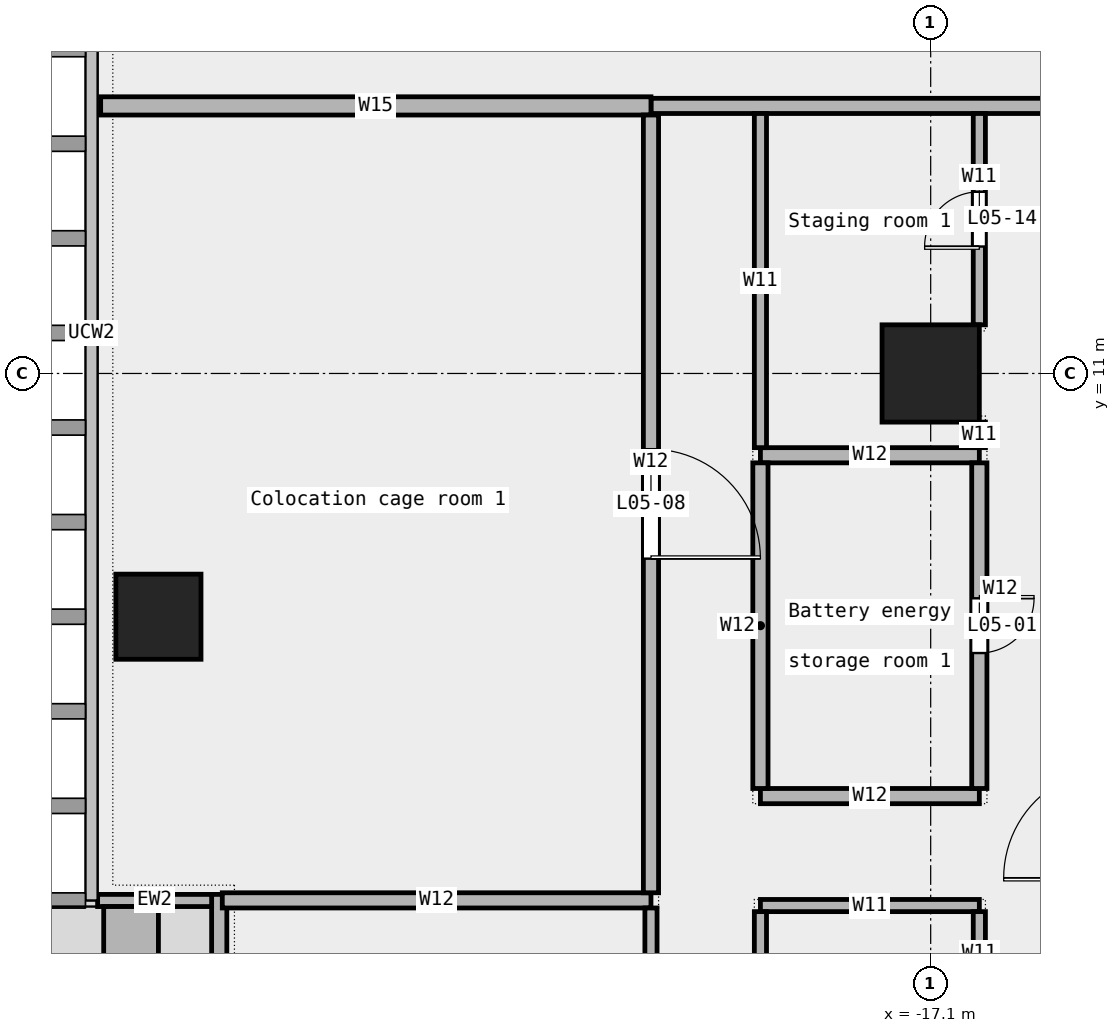
"""IFC4 building model, lengths in metres.
Left out: names, types, materials, properties, quantities, classifications, styles, units other than length and angle.
Written with IfcOpenShell. Run it as: python <this file> out.ifc"""

import sys

from ifc_helpers import new_model, si_unit, direction, frame, frame_2d, origin, origin_2d, place, context, subcontext, project, spatial, rectangle, extrude, element, fill, save


model = new_model("IFC4")
c1 = context("Model", 3, precision=1e-05, world=origin(), true_north=direction((0.0, 1.0)))
c2 = subcontext(c1, "Body", "Model", "MODEL_VIEW")
j1 = project(units=[si_unit("LENGTHUNIT", "METRE"), si_unit("PLANEANGLEUNIT", "RADIAN")], contexts=[c1])
p1 = place(None, origin())
s1 = spatial("IfcSite", under=j1, at=p1, CompositionType="ELEMENT")
p2 = place(p1, origin())
s2 = spatial("IfcBuilding", under=s1, at=p2, CompositionType="ELEMENT")
p3 = place(p2, frame((0.0, 0.0, 31.0)))
s3 = spatial("IfcBuildingStorey", under=s2, at=p3, CompositionType="ELEMENT", Elevation=31.0)
p4 = place(p3, frame((-29.8, 7.0, 0.0), z_axis=(0.0, 0.0, 1.0), x_axis=(1.0, 0.0, 0.0)))
e1 = element("IfcColumn", 1, at=p4, inside=s3, PredefinedType="COLUMN", context=c2, shape_type="SweptSolid", body=[
    extrude(rectangle(XDim=1.4, YDim=1.4, at=origin_2d()), origin(), (0.0, 0.0, 1.0), 4.35),
])
p5 = place(p3, frame((-17.1, 11.0, 0.0), z_axis=(0.0, 0.0, 1.0), x_axis=(1.0, 0.0, 0.0)))
e2 = element("IfcColumn", 2, at=p5, inside=s3, PredefinedType="COLUMN", context=c2, shape_type="SweptSolid", body=[
    extrude(rectangle(XDim=1.6, YDim=1.6, at=origin_2d()), origin(), (0.0, 0.0, 1.0), 4.35),
])
p6 = place(p3, frame((-28.8, 2.433, 0.0), z_axis=(0.0, 0.0, 1.0), x_axis=(0.0, -1.0, 0.0)))
e3 = element("IfcWall", 3, at=p6, inside=s3, PredefinedType="STANDARD", context=c2, shape_type="SweptSolid", body=[
    extrude(rectangle(XDim=14.2, YDim=0.25, at=frame_2d((7.1, 0.0))), origin(), (0.0, 0.0, 1.0), 4.35),
])
p7 = place(p6, frame((1.75, 0.0, 0.45)))
e4 = element("IfcOpeningElement", 4, at=p7, cuts=e3, PredefinedType="OPENING", context=c2, shape_type="SweptSolid", body=[
    extrude(rectangle(XDim=1.5, YDim=3.0, at=frame_2d((0.75, 1.5))), frame((0.0, 0.137, 0.0), z_axis=(0.0, -1.0, 0.0), x_axis=(1.0, 0.0, 0.0)), (0.0, 0.0, 1.0), 0.274),
])
p8 = place(p6, frame((6.25, 0.0, 0.0)))
e5 = element("IfcOpeningElement", 5, at=p8, cuts=e3, PredefinedType="OPENING", context=c2, shape_type="SweptSolid", body=[
    extrude(rectangle(XDim=1.8, YDim=2.4, at=frame_2d((0.9, 1.2))), frame((0.0, 0.137, 0.0), z_axis=(0.0, -1.0, 0.0), x_axis=(1.0, 0.0, 0.0)), (0.0, 0.0, 1.0), 0.274),
])
p9 = place(p6, frame((11.0, 0.0, 0.45)))
e6 = element("IfcOpeningElement", 6, at=p9, cuts=e3, PredefinedType="OPENING", context=c2, shape_type="SweptSolid", body=[
    extrude(rectangle(XDim=1.5, YDim=3.0, at=frame_2d((0.75, 1.5))), frame((0.0, 0.137, 0.0), z_axis=(0.0, -1.0, 0.0), x_axis=(1.0, 0.0, 0.0)), (0.0, 0.0, 1.0), 0.274),
])
p10 = place(p3, frame((-30.8, 2.333, 0.0), z_axis=(0.0, 0.0, 1.0), x_axis=(1.0, 0.0, 0.0)))
e7 = element("IfcWall", 7, at=p10, inside=s3, PredefinedType="STANDARD", context=c2, shape_type="SweptSolid", body=[
    extrude(rectangle(XDim=1.875, YDim=0.2, at=frame_2d((0.938, 0.0))), origin(), (0.0, 0.0, 1.0), 4.35),
])
p11 = place(p3, frame((-30.25, 2.233, 0.0), z_axis=(0.0, 0.0, 1.0), x_axis=(0.0, -1.0, 0.0)))
e8 = element("IfcWall", 8, at=p11, inside=s3, PredefinedType="STANDARD", context=c2, shape_type="SweptSolid", body=[
    extrude(rectangle(XDim=3.6, YDim=0.9, at=frame_2d((1.8, 0.0))), origin(), (0.0, 0.0, 1.0), 0.7),
])
p12 = place(p3, frame((-19.9, 2.25, 0.0), z_axis=(0.0, 0.0, 1.0), x_axis=(1.0, 0.0, 0.0)))
e9 = element("IfcWall", 9, at=p12, inside=s3, PredefinedType="PARTITIONING", context=c2, shape_type="SweptSolid", body=[
    extrude(rectangle(XDim=3.6, YDim=0.2, at=frame_2d((1.8, 0.0))), origin(), (0.0, 0.0, 1.0), 4.35),
])
p13 = place(p3, frame((-28.75, 2.335, 0.0), z_axis=(0.0, 0.0, 1.0), x_axis=(1.0, 0.0, 0.0)))
e10 = element("IfcWall", 10, at=p13, inside=s3, PredefinedType="PARTITIONING", context=c2, shape_type="SweptSolid", body=[
    extrude(rectangle(XDim=7.05, YDim=0.25, at=frame_2d((3.525, 0.0))), origin(), (0.0, 0.0, 1.0), 4.35),
])
for number, where, z_axis, x_axis in (
    (11, (-19.9, 4.05, 0.0), (0.0, 0.0, 1.0), (1.0, 0.0, 0.0)),
    (12, (-19.9, 9.655, 0.0), (0.0, 0.0, 1.0), (1.0, 0.0, 0.0)),
):
    element("IfcWall", number, at=place(p3, frame(where, z_axis=z_axis, x_axis=x_axis)), inside=s3, PredefinedType="PARTITIONING", context=c2, shape_type="SweptSolid", body=[
        extrude(rectangle(XDim=3.6, YDim=0.25, at=frame_2d((1.8, 0.0))), origin(), (0.0, 0.0, 1.0), 4.35),
    ])
p14 = place(p3, frame((-21.7, 15.4, 0.0), z_axis=(0.0, 0.0, 1.0), x_axis=(1.0, 0.0, 0.0)))
e13 = element("IfcWall", 13, at=p14, inside=s3, PredefinedType="PARTITIONING", context=c2, shape_type="SweptSolid", body=[
    extrude(rectangle(XDim=14.935, YDim=0.25, at=frame_2d((7.468, 0.0))), origin(), (0.0, 0.0, 1.0), 4.35),
])
p15 = place(p14, frame((12.775, 0.0, 0.0)))
e14 = element("IfcOpeningElement", 14, at=p15, cuts=e13, PredefinedType="OPENING", context=c2, shape_type="SweptSolid", body=[
    extrude(rectangle(XDim=0.9, YDim=2.1, at=frame_2d((0.45, 1.05))), frame((0.0, 0.137, 0.0), z_axis=(0.0, -1.0, 0.0), x_axis=(1.0, 0.0, 0.0)), (0.0, 0.0, 1.0), 0.274),
])
p16 = place(p14, frame((7.558, 0.0, 0.0)))
e15 = element("IfcOpeningElement", 15, at=p16, cuts=e13, PredefinedType="OPENING", context=c2, shape_type="SweptSolid", body=[
    extrude(rectangle(XDim=1.8, YDim=2.1, at=frame_2d((0.9, 1.05))), frame((0.0, 0.137, 0.0), z_axis=(0.0, -1.0, 0.0), x_axis=(1.0, 0.0, 0.0)), (0.0, 0.0, 1.0), 0.274),
])
p17 = place(p3, frame((-30.75, 15.4, 0.0), z_axis=(0.0, 0.0, 1.0), x_axis=(1.0, 0.0, 0.0)))
e16 = element("IfcWall", 16, at=p17, inside=s3, PredefinedType="PARTITIONING", context=c2, shape_type="SweptSolid", body=[
    extrude(rectangle(XDim=9.05, YDim=0.3, at=frame_2d((4.525, 0.0))), origin(), (0.0, 0.0, 1.0), 4.35),
])
p18 = place(p3, frame((-21.7, -9.0, 0.0), z_axis=(0.0, 0.0, 1.0), x_axis=(0.0, 1.0, 0.0)))
e17 = element("IfcWall", 17, at=p18, inside=s3, PredefinedType="PARTITIONING", context=c2, shape_type="SweptSolid", body=[
    extrude(rectangle(XDim=11.21, YDim=0.2, at=frame_2d((5.605, 0.0))), origin(), (0.0, 0.0, 1.0), 4.35),
])
p19 = place(p18, frame((4.705, 0.0, 0.0)))
e18 = element("IfcOpeningElement", 18, at=p19, cuts=e17, PredefinedType="OPENING", context=c2, shape_type="SweptSolid", body=[
    extrude(rectangle(XDim=1.8, YDim=2.1, at=frame_2d((0.9, 1.05))), frame((0.0, 0.112, 0.0), z_axis=(0.0, -1.0, 0.0), x_axis=(1.0, 0.0, 0.0)), (0.0, 0.0, 1.0), 0.224),
])
p20 = place(p3, frame((-21.7, 2.46, 0.0), z_axis=(0.0, 0.0, 1.0), x_axis=(0.0, 1.0, 0.0)))
e19 = element("IfcWall", 19, at=p20, inside=s3, PredefinedType="PARTITIONING", context=c2, shape_type="SweptSolid", body=[
    extrude(rectangle(XDim=12.79, YDim=0.25, at=frame_2d((6.395, 0.0))), origin(), (0.0, 0.0, 1.0), 4.35),
])
p21 = place(p20, frame((5.495, 0.0, 0.0)))
e20 = element("IfcOpeningElement", 20, at=p21, cuts=e19, PredefinedType="OPENING", context=c2, shape_type="SweptSolid", body=[
    extrude(rectangle(XDim=1.8, YDim=2.1, at=frame_2d((0.9, 1.05))), frame((0.0, 0.137, 0.0), z_axis=(0.0, -1.0, 0.0), x_axis=(1.0, 0.0, 0.0)), (0.0, 0.0, 1.0), 0.274),
])
p22 = place(p3, frame((-19.9, -9.0, 0.0), z_axis=(0.0, 0.0, 1.0), x_axis=(0.0, 1.0, 0.0)))
e21 = element("IfcWall", 21, at=p22, inside=s3, PredefinedType="PARTITIONING", context=c2, shape_type="SweptSolid", body=[
    extrude(rectangle(XDim=11.15, YDim=0.2, at=frame_2d((5.575, 0.0))), origin(), (0.0, 0.0, 1.0), 4.35),
])
p23 = place(p3, frame((-19.9, 9.78, 0.0), z_axis=(0.0, 0.0, 1.0), x_axis=(0.0, 1.0, 0.0)))
e22 = element("IfcWall", 22, at=p23, inside=s3, PredefinedType="PARTITIONING", context=c2, shape_type="SweptSolid", body=[
    extrude(rectangle(XDim=5.495, YDim=0.2, at=frame_2d((2.748, 0.0))), origin(), (0.0, 0.0, 1.0), 4.35),
])
p24 = place(p3, frame((-19.9, 4.175, 0.0), z_axis=(0.0, 0.0, 1.0), x_axis=(0.0, 1.0, 0.0)))
e23 = element("IfcWall", 23, at=p24, inside=s3, PredefinedType="PARTITIONING", context=c2, shape_type="SweptSolid", body=[
    extrude(rectangle(XDim=5.355, YDim=0.25, at=frame_2d((2.677, 0.0))), origin(), (0.0, 0.0, 1.0), 4.35),
])
p25 = place(p3, frame((-16.3, 0.8, 0.0), z_axis=(0.0, 0.0, 1.0), x_axis=(0.0, 1.0, 0.0)))
e24 = element("IfcWall", 24, at=p25, inside=s3, PredefinedType="PARTITIONING", context=c2, shape_type="SweptSolid", body=[
    extrude(rectangle(XDim=1.35, YDim=0.2, at=frame_2d((0.675, 0.0))), origin(), (0.0, 0.0, 1.0), 4.35),
])
p26 = place(p3, frame((-16.3, 9.78, 0.0), z_axis=(0.0, 0.0, 1.0), x_axis=(0.0, 1.0, 0.0)))
e25 = element("IfcWall", 25, at=p26, inside=s3, PredefinedType="PARTITIONING", context=c2, shape_type="SweptSolid", body=[
    extrude(rectangle(XDim=0.42, YDim=0.2, at=frame_2d((0.21, 0.0))), origin(), (0.0, 0.0, 1.0), 4.35),
])
p27 = place(p3, frame((-16.3, 11.8, 0.0), z_axis=(0.0, 0.0, 1.0), x_axis=(0.0, 1.0, 0.0)))
e26 = element("IfcWall", 26, at=p27, inside=s3, PredefinedType="PARTITIONING", context=c2, shape_type="SweptSolid", body=[
    extrude(rectangle(XDim=3.475, YDim=0.2, at=frame_2d((1.737, 0.0))), origin(), (0.0, 0.0, 1.0), 4.35),
])
p28 = place(p27, frame((1.288, 0.0, 0.0)))
e27 = element("IfcOpeningElement", 27, at=p28, cuts=e26, PredefinedType="OPENING", context=c2, shape_type="SweptSolid", body=[
    extrude(rectangle(XDim=0.9, YDim=2.1, at=frame_2d((0.45, 1.05))), frame((0.0, 0.112, 0.0), z_axis=(0.0, -1.0, 0.0), x_axis=(1.0, 0.0, 0.0)), (0.0, 0.0, 1.0), 0.224),
])
p29 = place(p3, frame((-16.3, 4.175, 0.0), z_axis=(0.0, 0.0, 1.0), x_axis=(0.0, 1.0, 0.0)))
e28 = element("IfcWall", 28, at=p29, inside=s3, PredefinedType="PARTITIONING", context=c2, shape_type="SweptSolid", body=[
    extrude(rectangle(XDim=5.355, YDim=0.25, at=frame_2d((2.677, 0.0))), origin(), (0.0, 0.0, 1.0), 4.35),
])
p30 = place(p29, frame((2.228, 0.0, 0.0)))
e29 = element("IfcOpeningElement", 29, at=p30, cuts=e28, PredefinedType="OPENING", context=c2, shape_type="SweptSolid", body=[
    extrude(rectangle(XDim=0.9, YDim=2.1, at=frame_2d((0.45, 1.05))), frame((0.0, 0.137, 0.0), z_axis=(0.0, -1.0, 0.0), x_axis=(1.0, 0.0, 0.0)), (0.0, 0.0, 1.0), 0.274),
])
p31 = place(p30, origin())
e30 = element("IfcDoor", 30, at=p31, inside=s3, OperationType="SINGLE_SWING_LEFT", PredefinedType="DOOR", context=c2, shape_type="SweptSolid", body=[
    extrude(rectangle(XDim=0.9, YDim=2.1, at=frame_2d((0.45, 1.05))), frame((0.0, 0.025, 0.0), z_axis=(0.0, -1.0, 0.0), x_axis=(1.0, 0.0, 0.0)), (0.0, 0.0, 1.0), 0.05),
])
fill(e29, e30)
p32 = place(p21, origin())
e31 = element("IfcDoor", 31, at=p32, inside=s3, OperationType="DOUBLE_DOOR_SINGLE_SWING", PredefinedType="DOOR", context=c2, shape_type="SweptSolid", body=[
    extrude(rectangle(XDim=1.8, YDim=2.1, at=frame_2d((0.9, 1.05))), frame((0.0, 0.025, 0.0), z_axis=(0.0, -1.0, 0.0), x_axis=(1.0, 0.0, 0.0)), (0.0, 0.0, 1.0), 0.05),
])
fill(e20, e31)
p33 = place(p28, origin())
e32 = element("IfcDoor", 32, at=p33, inside=s3, OperationType="SINGLE_SWING_LEFT", PredefinedType="DOOR", context=c2, shape_type="SweptSolid", body=[
    extrude(rectangle(XDim=0.9, YDim=2.1, at=frame_2d((0.45, 1.05))), frame((0.0, 0.025, 0.0), z_axis=(0.0, -1.0, 0.0), x_axis=(1.0, 0.0, 0.0)), (0.0, 0.0, 1.0), 0.05),
])
fill(e27, e32)
save(model, sys.argv[1])
